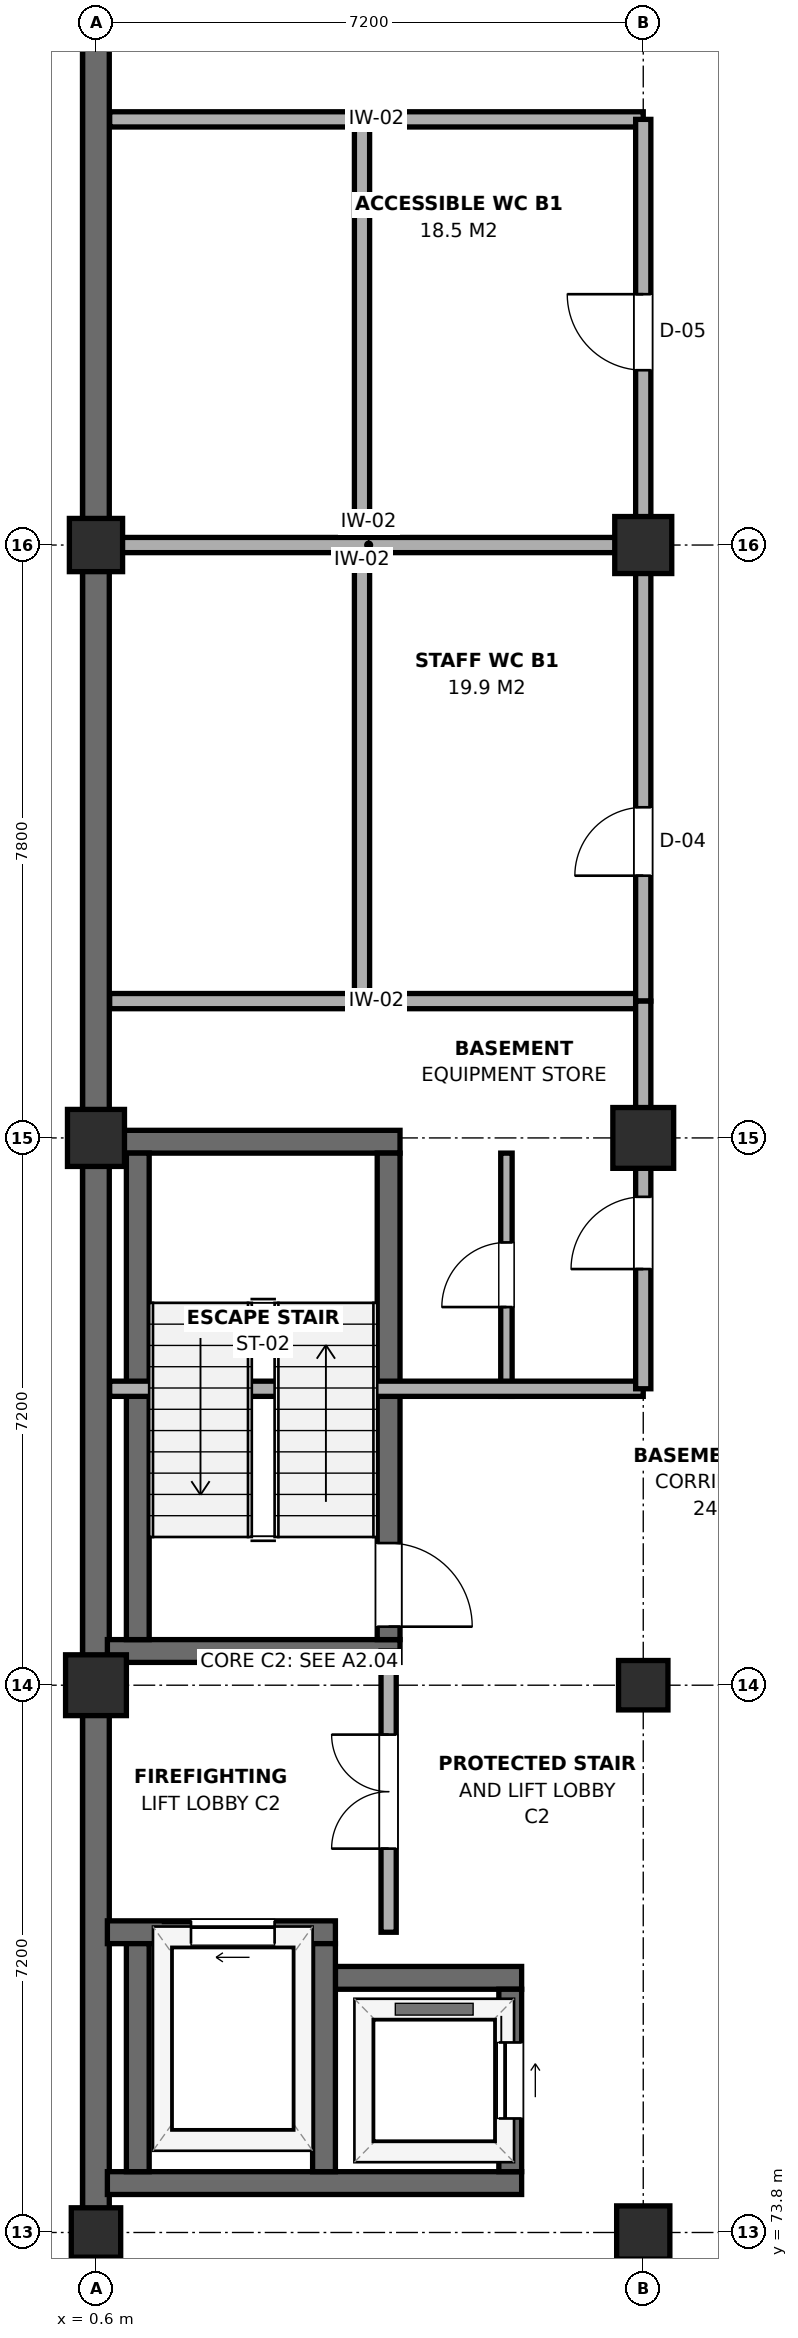
"""IFC4 building model, lengths in metres.
Left out: names, types, materials, properties, quantities, classifications, styles, units other than length and angle.
Written with IfcOpenShell. Run it as: python <this file> out.ifc"""

import sys

from ifc_helpers import new_model, si_unit, direction, frame, frame_2d, origin, origin_2d, place, context, subcontext, project, spatial, rectangle, extrude, element, fill, save


model = new_model("IFC4")
c1 = context("Model", 3, precision=1e-05, world=origin(), true_north=direction((0.0, 1.0)))
c2 = subcontext(c1, "Body", "Model", "MODEL_VIEW")
j1 = project(units=[si_unit("LENGTHUNIT", "METRE"), si_unit("PLANEANGLEUNIT", "RADIAN")], contexts=[c1])
p1 = place(None, origin())
s1 = spatial("IfcSite", under=j1, at=p1, CompositionType="ELEMENT")
p2 = place(p1, origin())
s2 = spatial("IfcBuilding", under=s1, at=p2, CompositionType="ELEMENT")
p3 = place(p2, frame((0.0, 0.0, -4.2)))
s3 = spatial("IfcBuildingStorey", under=s2, at=p3, CompositionType="ELEMENT", Elevation=-4.2)
p4 = place(p3, frame((0.6, 73.8, 0.0), z_axis=(0.0, 0.0, 1.0), x_axis=(1.0, 0.0, 0.0)))
e1 = element("IfcColumn", 1, at=p4, inside=s3, PredefinedType="COLUMN", context=c2, shape_type="SweptSolid", body=[
    extrude(rectangle(XDim=0.65, YDim=0.65, at=origin_2d()), origin(), (0.0, 0.0, 1.0), 4.2),
])
p5 = place(p3, frame((0.6, 81.0, 0.0), z_axis=(0.0, 0.0, 1.0), x_axis=(1.0, 0.0, 0.0)))
e2 = element("IfcColumn", 2, at=p5, inside=s3, PredefinedType="COLUMN", context=c2, shape_type="SweptSolid", body=[
    extrude(rectangle(XDim=0.8, YDim=0.8, at=origin_2d()), origin(), (0.0, 0.0, 1.0), 4.2),
])
p6 = place(p3, frame((0.6, 88.2, 0.0), z_axis=(0.0, 0.0, 1.0), x_axis=(1.0, 0.0, 0.0)))
e3 = element("IfcColumn", 3, at=p6, inside=s3, PredefinedType="COLUMN", context=c2, shape_type="SweptSolid", body=[
    extrude(rectangle(XDim=0.75, YDim=0.75, at=origin_2d()), origin(), (0.0, 0.0, 1.0), 4.2),
])
for number, where, z_axis, x_axis in (
    (4, (0.6, 96.0, 0.0), (0.0, 0.0, 1.0), (1.0, 0.0, 0.0)),
    (5, (7.8, 73.8, 0.0), (0.0, 0.0, 1.0), (1.0, 0.0, 0.0)),
):
    element("IfcColumn", number, at=place(p3, frame(where, z_axis=z_axis, x_axis=x_axis)), inside=s3, PredefinedType="COLUMN", context=c2, shape_type="SweptSolid", body=[
        extrude(rectangle(XDim=0.7, YDim=0.7, at=origin_2d()), origin(), (0.0, 0.0, 1.0), 4.2),
    ])
p7 = place(p3, frame((7.8, 81.0, 0.0), z_axis=(0.0, 0.0, 1.0), x_axis=(1.0, 0.0, 0.0)))
e6 = element("IfcColumn", 6, at=p7, inside=s3, PredefinedType="COLUMN", context=c2, shape_type="SweptSolid", body=[
    extrude(rectangle(XDim=0.65, YDim=0.65, at=origin_2d()), origin(), (0.0, 0.0, 1.0), 4.2),
])
p8 = place(p3, frame((7.8, 88.2, 0.0), z_axis=(0.0, 0.0, 1.0), x_axis=(1.0, 0.0, 0.0)))
e7 = element("IfcColumn", 7, at=p8, inside=s3, PredefinedType="COLUMN", context=c2, shape_type="SweptSolid", body=[
    extrude(rectangle(XDim=0.8, YDim=0.8, at=origin_2d()), origin(), (0.0, 0.0, 1.0), 4.2),
])
p9 = place(p3, frame((7.8, 96.0, 0.0), z_axis=(0.0, 0.0, 1.0), x_axis=(1.0, 0.0, 0.0)))
e8 = element("IfcColumn", 8, at=p9, inside=s3, PredefinedType="COLUMN", context=c2, shape_type="SweptSolid", body=[
    extrude(rectangle(XDim=0.75, YDim=0.75, at=origin_2d()), origin(), (0.0, 0.0, 1.0), 4.2),
])
p10 = place(p3, frame((0.6, 130.625, 0.0), z_axis=(0.0, 0.0, 1.0), x_axis=(0.0, -1.0, 0.0)))
e9 = element("IfcWall", 9, at=p10, inside=s3, PredefinedType="USERDEFINED", context=c2, shape_type="SweptSolid", body=[
    extrude(rectangle(XDim=129.25, YDim=0.35, at=frame_2d((64.625, 0.0))), origin(), (0.0, 0.0, 1.0), 3.92),
])
for number, where, z_axis, x_axis in (
    (10, (0.75, 81.45, 0.0), (0.0, 0.0, 1.0), (1.0, 0.0, 0.0)),
    (11, (0.75, 88.15, 0.0), (0.0, 0.0, 1.0), (1.0, 0.0, 0.0)),
):
    element("IfcWall", number, at=place(p3, frame(where, z_axis=z_axis, x_axis=x_axis)), inside=s3, PredefinedType="SHEAR", context=c2, shape_type="SweptSolid", body=[
        extrude(rectangle(XDim=3.85, YDim=0.3, at=frame_2d((1.925, 0.0))), origin(), (0.0, 0.0, 1.0), 3.92),
    ])
p11 = place(p3, frame((1.15, 81.6, 0.0), z_axis=(0.0, 0.0, 1.0), x_axis=(0.0, 1.0, 0.0)))
e12 = element("IfcWall", 12, at=p11, inside=s3, PredefinedType="SHEAR", context=c2, shape_type="SweptSolid", body=[
    extrude(rectangle(XDim=6.4, YDim=0.3, at=frame_2d((3.2, 0.0))), origin(), (0.0, 0.0, 1.0), 3.92),
])
p12 = place(p3, frame((4.45, 81.6, 0.0), z_axis=(0.0, 0.0, 1.0), x_axis=(0.0, 1.0, 0.0)))
e13 = element("IfcWall", 13, at=p12, inside=s3, PredefinedType="SHEAR", context=c2, shape_type="SweptSolid", body=[
    extrude(rectangle(XDim=6.4, YDim=0.3, at=frame_2d((3.2, 0.0))), origin(), (0.0, 0.0, 1.0), 3.92),
])
p13 = place(p12, frame((0.17, 0.0, 0.0)))
e14 = element("IfcOpeningElement", 14, at=p13, cuts=e13, PredefinedType="OPENING", context=c2, shape_type="SweptSolid", body=[
    extrude(rectangle(XDim=1.1, YDim=2.15, at=frame_2d((0.55, 1.075))), frame((0.0, 0.165, 0.0), z_axis=(0.0, -1.0, 0.0), x_axis=(1.0, 0.0, 0.0)), (0.0, 0.0, 1.0), 0.33),
])
p14 = place(p3, frame((0.75, 74.45, 0.0), z_axis=(0.0, 0.0, 1.0), x_axis=(1.0, 0.0, 0.0)))
e15 = element("IfcWall", 15, at=p14, inside=s3, PredefinedType="SHEAR", context=c2, shape_type="SweptSolid", body=[
    extrude(rectangle(XDim=5.45, YDim=0.3, at=frame_2d((2.725, 0.0))), origin(), (0.0, 0.0, 1.0), 3.92),
])
p15 = place(p3, frame((0.75, 77.75, 0.0), z_axis=(0.0, 0.0, 1.0), x_axis=(1.0, 0.0, 0.0)))
e16 = element("IfcWall", 16, at=p15, inside=s3, PredefinedType="SHEAR", context=c2, shape_type="SweptSolid", body=[
    extrude(rectangle(XDim=3.0, YDim=0.3, at=frame_2d((1.5, 0.0))), origin(), (0.0, 0.0, 1.0), 3.92),
])
p16 = place(p15, frame((1.1, 0.0, 0.0)))
e17 = element("IfcOpeningElement", 17, at=p16, cuts=e16, PredefinedType="OPENING", context=c2, shape_type="SweptSolid", body=[
    extrude(rectangle(XDim=1.1, YDim=2.15, at=frame_2d((0.55, 1.075))), frame((0.0, 0.165, 0.0), z_axis=(0.0, -1.0, 0.0), x_axis=(1.0, 0.0, 0.0)), (0.0, 0.0, 1.0), 0.33),
])
p17 = place(p3, frame((3.75, 77.15, 0.0), z_axis=(0.0, 0.0, 1.0), x_axis=(1.0, 0.0, 0.0)))
e18 = element("IfcWall", 18, at=p17, inside=s3, PredefinedType="SHEAR", context=c2, shape_type="SweptSolid", body=[
    extrude(rectangle(XDim=2.45, YDim=0.3, at=frame_2d((1.225, 0.0))), origin(), (0.0, 0.0, 1.0), 3.92),
])
for number, where, z_axis, x_axis in (
    (19, (1.15, 74.6, 0.0), (0.0, 0.0, 1.0), (0.0, 1.0, 0.0)),
    (20, (3.6, 74.6, 0.0), (0.0, 0.0, 1.0), (0.0, 1.0, 0.0)),
):
    element("IfcWall", number, at=place(p3, frame(where, z_axis=z_axis, x_axis=x_axis)), inside=s3, PredefinedType="SHEAR", context=c2, shape_type="SweptSolid", body=[
        extrude(rectangle(XDim=3.0, YDim=0.3, at=frame_2d((1.5, 0.0))), origin(), (0.0, 0.0, 1.0), 3.92),
    ])
p18 = place(p3, frame((6.05, 74.6, 0.0), z_axis=(0.0, 0.0, 1.0), x_axis=(0.0, 1.0, 0.0)))
e21 = element("IfcWall", 21, at=p18, inside=s3, PredefinedType="SHEAR", context=c2, shape_type="SweptSolid", body=[
    extrude(rectangle(XDim=2.4, YDim=0.3, at=frame_2d((1.2, 0.0))), origin(), (0.0, 0.0, 1.0), 3.92),
])
p19 = place(p18, frame((0.7, 0.0, 0.0)))
e22 = element("IfcOpeningElement", 22, at=p19, cuts=e21, PredefinedType="OPENING", context=c2, shape_type="SweptSolid", body=[
    extrude(rectangle(XDim=1.0, YDim=2.15, at=frame_2d((0.5, 1.075))), frame((0.0, 0.165, 0.0), z_axis=(0.0, -1.0, 0.0), x_axis=(1.0, 0.0, 0.0)), (0.0, 0.0, 1.0), 0.33),
])
p20 = place(p3, frame((4.45, 77.75, 0.0), z_axis=(0.0, 0.0, 1.0), x_axis=(0.0, 1.0, 0.0)))
e23 = element("IfcWall", 23, at=p20, inside=s3, PredefinedType="PARTITIONING", context=c2, shape_type="SweptSolid", body=[
    extrude(rectangle(XDim=3.7, YDim=0.2, at=frame_2d((1.85, 0.0))), origin(), (0.0, 0.0, 1.0), 3.315),
])
p21 = place(p20, frame((1.1, 0.0, 0.0)))
e24 = element("IfcOpeningElement", 24, at=p21, cuts=e23, PredefinedType="OPENING", context=c2, shape_type="SweptSolid", body=[
    extrude(rectangle(XDim=1.5, YDim=2.15, at=frame_2d((0.75, 1.075))), frame((0.0, 0.115, 0.0), z_axis=(0.0, -1.0, 0.0), x_axis=(1.0, 0.0, 0.0)), (0.0, 0.0, 1.0), 0.23),
])
p22 = place(p3, frame((6.0, 84.8, 0.0), z_axis=(0.0, 0.0, 1.0), x_axis=(0.0, 1.0, 0.0)))
e25 = element("IfcWall", 25, at=p22, inside=s3, PredefinedType="PARTITIONING", context=c2, shape_type="SweptSolid", body=[
    extrude(rectangle(XDim=3.2, YDim=0.15, at=frame_2d((1.6, 0.0))), origin(), (0.0, 0.0, 1.0), 3.265),
])
p23 = place(p22, frame((1.175, 0.0, 0.0)))
e26 = element("IfcOpeningElement", 26, at=p23, cuts=e25, PredefinedType="OPENING", context=c2, shape_type="SweptSolid", body=[
    extrude(rectangle(XDim=0.85, YDim=2.1, at=frame_2d((0.425, 1.05))), frame((0.0, 0.09, 0.0), z_axis=(0.0, -1.0, 0.0), x_axis=(1.0, 0.0, 0.0)), (0.0, 0.0, 1.0), 0.18),
])
p24 = place(p3, frame((4.1, 90.0, 0.0), z_axis=(0.0, 0.0, 1.0), x_axis=(0.0, 1.0, 0.0)))
e27 = element("IfcWall", 27, at=p24, inside=s3, PredefinedType="PARTITIONING", context=c2, shape_type="SweptSolid", body=[
    extrude(rectangle(XDim=11.6, YDim=0.2, at=frame_2d((5.8, 0.0))), origin(), (0.0, 0.0, 1.0), 3.415),
])
p25 = place(p3, frame((0.78, 90.0, 0.0), z_axis=(0.0, 0.0, 1.0), x_axis=(1.0, 0.0, 0.0)))
e28 = element("IfcWall", 28, at=p25, inside=s3, PredefinedType="PARTITIONING", context=c2, shape_type="SweptSolid", body=[
    extrude(rectangle(XDim=7.02, YDim=0.2, at=frame_2d((3.51, 0.0))), origin(), (0.0, 0.0, 1.0), 3.265),
])
p26 = place(p3, frame((0.78, 84.9, 0.0), z_axis=(0.0, 0.0, 1.0), x_axis=(1.0, 0.0, 0.0)))
e29 = element("IfcWall", 29, at=p26, inside=s3, PredefinedType="PARTITIONING", context=c2, shape_type="SweptSolid", body=[
    extrude(rectangle(XDim=7.02, YDim=0.2, at=frame_2d((3.51, 0.0))), origin(), (0.0, 0.0, 1.0), 3.315),
])
p27 = place(p3, frame((0.78, 96.0, 0.0), z_axis=(0.0, 0.0, 1.0), x_axis=(1.0, 0.0, 0.0)))
e30 = element("IfcWall", 30, at=p27, inside=s3, PredefinedType="PARTITIONING", context=c2, shape_type="SweptSolid", body=[
    extrude(rectangle(XDim=7.02, YDim=0.2, at=frame_2d((3.51, 0.0))), origin(), (0.0, 0.0, 1.0), 3.415),
])
p28 = place(p3, frame((0.78, 101.6, 0.0), z_axis=(0.0, 0.0, 1.0), x_axis=(1.0, 0.0, 0.0)))
e31 = element("IfcWall", 31, at=p28, inside=s3, PredefinedType="PARTITIONING", context=c2, shape_type="SweptSolid", body=[
    extrude(rectangle(XDim=7.02, YDim=0.2, at=frame_2d((3.51, 0.0))), origin(), (0.0, 0.0, 1.0), 3.115),
])
p29 = place(p3, frame((7.8, 90.0, 0.0), z_axis=(0.0, 0.0, 1.0), x_axis=(0.0, 1.0, 0.0)))
e32 = element("IfcWall", 32, at=p29, inside=s3, PredefinedType="PARTITIONING", context=c2, shape_type="SweptSolid", body=[
    extrude(rectangle(XDim=6.0, YDim=0.2, at=frame_2d((3.0, 0.0))), origin(), (0.0, 0.0, 1.0), 3.265),
])
p30 = place(p29, frame((1.65, 0.0, 0.0)))
e33 = element("IfcOpeningElement", 33, at=p30, cuts=e32, PredefinedType="OPENING", context=c2, shape_type="SweptSolid", body=[
    extrude(rectangle(XDim=0.9, YDim=2.15, at=frame_2d((0.45, 1.075))), frame((0.0, 0.115, 0.0), z_axis=(0.0, -1.0, 0.0), x_axis=(1.0, 0.0, 0.0)), (0.0, 0.0, 1.0), 0.23),
])
p31 = place(p3, frame((7.8, 96.0, 0.0), z_axis=(0.0, 0.0, 1.0), x_axis=(0.0, 1.0, 0.0)))
e34 = element("IfcWall", 34, at=p31, inside=s3, PredefinedType="PARTITIONING", context=c2, shape_type="SweptSolid", body=[
    extrude(rectangle(XDim=5.6, YDim=0.2, at=frame_2d((2.8, 0.0))), origin(), (0.0, 0.0, 1.0), 3.115),
])
p32 = place(p31, frame((2.3, 0.0, 0.0)))
e35 = element("IfcOpeningElement", 35, at=p32, cuts=e34, PredefinedType="OPENING", context=c2, shape_type="SweptSolid", body=[
    extrude(rectangle(XDim=1.0, YDim=2.15, at=frame_2d((0.5, 1.075))), frame((0.0, 0.115, 0.0), z_axis=(0.0, -1.0, 0.0), x_axis=(1.0, 0.0, 0.0)), (0.0, 0.0, 1.0), 0.23),
])
p33 = place(p3, frame((7.8, 84.9, 0.0), z_axis=(0.0, 0.0, 1.0), x_axis=(0.0, 1.0, 0.0)))
e36 = element("IfcWall", 36, at=p33, inside=s3, PredefinedType="PARTITIONING", context=c2, shape_type="SweptSolid", body=[
    extrude(rectangle(XDim=5.1, YDim=0.2, at=frame_2d((2.55, 0.0))), origin(), (0.0, 0.0, 1.0), 3.265),
])
p34 = place(p33, frame((1.575, 0.0, 0.0)))
e37 = element("IfcOpeningElement", 37, at=p34, cuts=e36, PredefinedType="OPENING", context=c2, shape_type="SweptSolid", body=[
    extrude(rectangle(XDim=0.95, YDim=2.15, at=frame_2d((0.475, 1.075))), frame((0.0, 0.115, 0.0), z_axis=(0.0, -1.0, 0.0), x_axis=(1.0, 0.0, 0.0)), (0.0, 0.0, 1.0), 0.23),
])
p35 = place(p13, frame((1.1, 0.0, 0.0), z_axis=(0.0, 0.0, 1.0), x_axis=(-1.0, 0.0, 0.0)))
e38 = element("IfcDoor", 38, at=p35, inside=s3, OperationType="SINGLE_SWING_RIGHT", PredefinedType="DOOR", context=c2, shape_type="SweptSolid", body=[
    extrude(rectangle(XDim=1.1, YDim=2.15, at=frame_2d((0.55, 1.075))), frame((0.0, 0.025, 0.0), z_axis=(0.0, -1.0, 0.0), x_axis=(1.0, 0.0, 0.0)), (0.0, 0.0, 1.0), 0.05),
])
fill(e14, e38)
p36 = place(p16, origin())
e39 = element("IfcDoor", 39, at=p36, inside=s3, OperationType="SLIDING_TO_LEFT", PredefinedType="DOOR", context=c2, shape_type="SweptSolid", body=[
    extrude(rectangle(XDim=1.1, YDim=2.15, at=frame_2d((0.55, 1.075))), frame((0.0, 0.025, 0.0), z_axis=(0.0, -1.0, 0.0), x_axis=(1.0, 0.0, 0.0)), (0.0, 0.0, 1.0), 0.05),
])
fill(e17, e39)
p37 = place(p19, frame((1.0, 0.0, 0.0), z_axis=(0.0, 0.0, 1.0), x_axis=(-1.0, 0.0, 0.0)))
e40 = element("IfcDoor", 40, at=p37, inside=s3, OperationType="SLIDING_TO_RIGHT", PredefinedType="DOOR", context=c2, shape_type="SweptSolid", body=[
    extrude(rectangle(XDim=1.0, YDim=2.15, at=frame_2d((0.5, 1.075))), frame((0.0, 0.025, 0.0), z_axis=(0.0, -1.0, 0.0), x_axis=(1.0, 0.0, 0.0)), (0.0, 0.0, 1.0), 0.05),
])
fill(e22, e40)
p38 = place(p21, origin())
e41 = element("IfcDoor", 41, at=p38, inside=s3, OperationType="DOUBLE_DOOR_SINGLE_SWING", PredefinedType="DOOR", context=c2, shape_type="SweptSolid", body=[
    extrude(rectangle(XDim=1.5, YDim=2.15, at=frame_2d((0.75, 1.075))), frame((0.0, 0.025, 0.0), z_axis=(0.0, -1.0, 0.0), x_axis=(1.0, 0.0, 0.0)), (0.0, 0.0, 1.0), 0.05),
])
fill(e24, e41)
p39 = place(p23, origin())
e42 = element("IfcDoor", 42, at=p39, inside=s3, OperationType="SINGLE_SWING_LEFT", PredefinedType="DOOR", context=c2, shape_type="SweptSolid", body=[
    extrude(rectangle(XDim=0.85, YDim=2.1, at=frame_2d((0.425, 1.05))), frame((0.0, 0.025, 0.0), z_axis=(0.0, -1.0, 0.0), x_axis=(1.0, 0.0, 0.0)), (0.0, 0.0, 1.0), 0.05),
])
fill(e26, e42)
p40 = place(p30, origin())
e43 = element("IfcDoor", 43, at=p40, inside=s3, OperationType="SINGLE_SWING_LEFT", PredefinedType="DOOR", context=c2, shape_type="SweptSolid", body=[
    extrude(rectangle(XDim=0.9, YDim=2.15, at=frame_2d((0.45, 1.075))), frame((0.0, 0.025, 0.0), z_axis=(0.0, -1.0, 0.0), x_axis=(1.0, 0.0, 0.0)), (0.0, 0.0, 1.0), 0.05),
])
fill(e33, e43)
p41 = place(p32, origin())
e44 = element("IfcDoor", 44, at=p41, inside=s3, OperationType="SINGLE_SWING_RIGHT", PredefinedType="DOOR", context=c2, shape_type="SweptSolid", body=[
    extrude(rectangle(XDim=1.0, YDim=2.15, at=frame_2d((0.5, 1.075))), frame((0.0, 0.025, 0.0), z_axis=(0.0, -1.0, 0.0), x_axis=(1.0, 0.0, 0.0)), (0.0, 0.0, 1.0), 0.05),
])
fill(e35, e44)
p42 = place(p34, origin())
e45 = element("IfcDoor", 45, at=p42, inside=s3, OperationType="SINGLE_SWING_LEFT", PredefinedType="DOOR", context=c2, shape_type="SweptSolid", body=[
    extrude(rectangle(XDim=0.95, YDim=2.15, at=frame_2d((0.475, 1.075))), frame((0.0, 0.025, 0.0), z_axis=(0.0, -1.0, 0.0), x_axis=(1.0, 0.0, 0.0)), (0.0, 0.0, 1.0), 0.05),
])
fill(e37, e45)
save(model, sys.argv[1])
